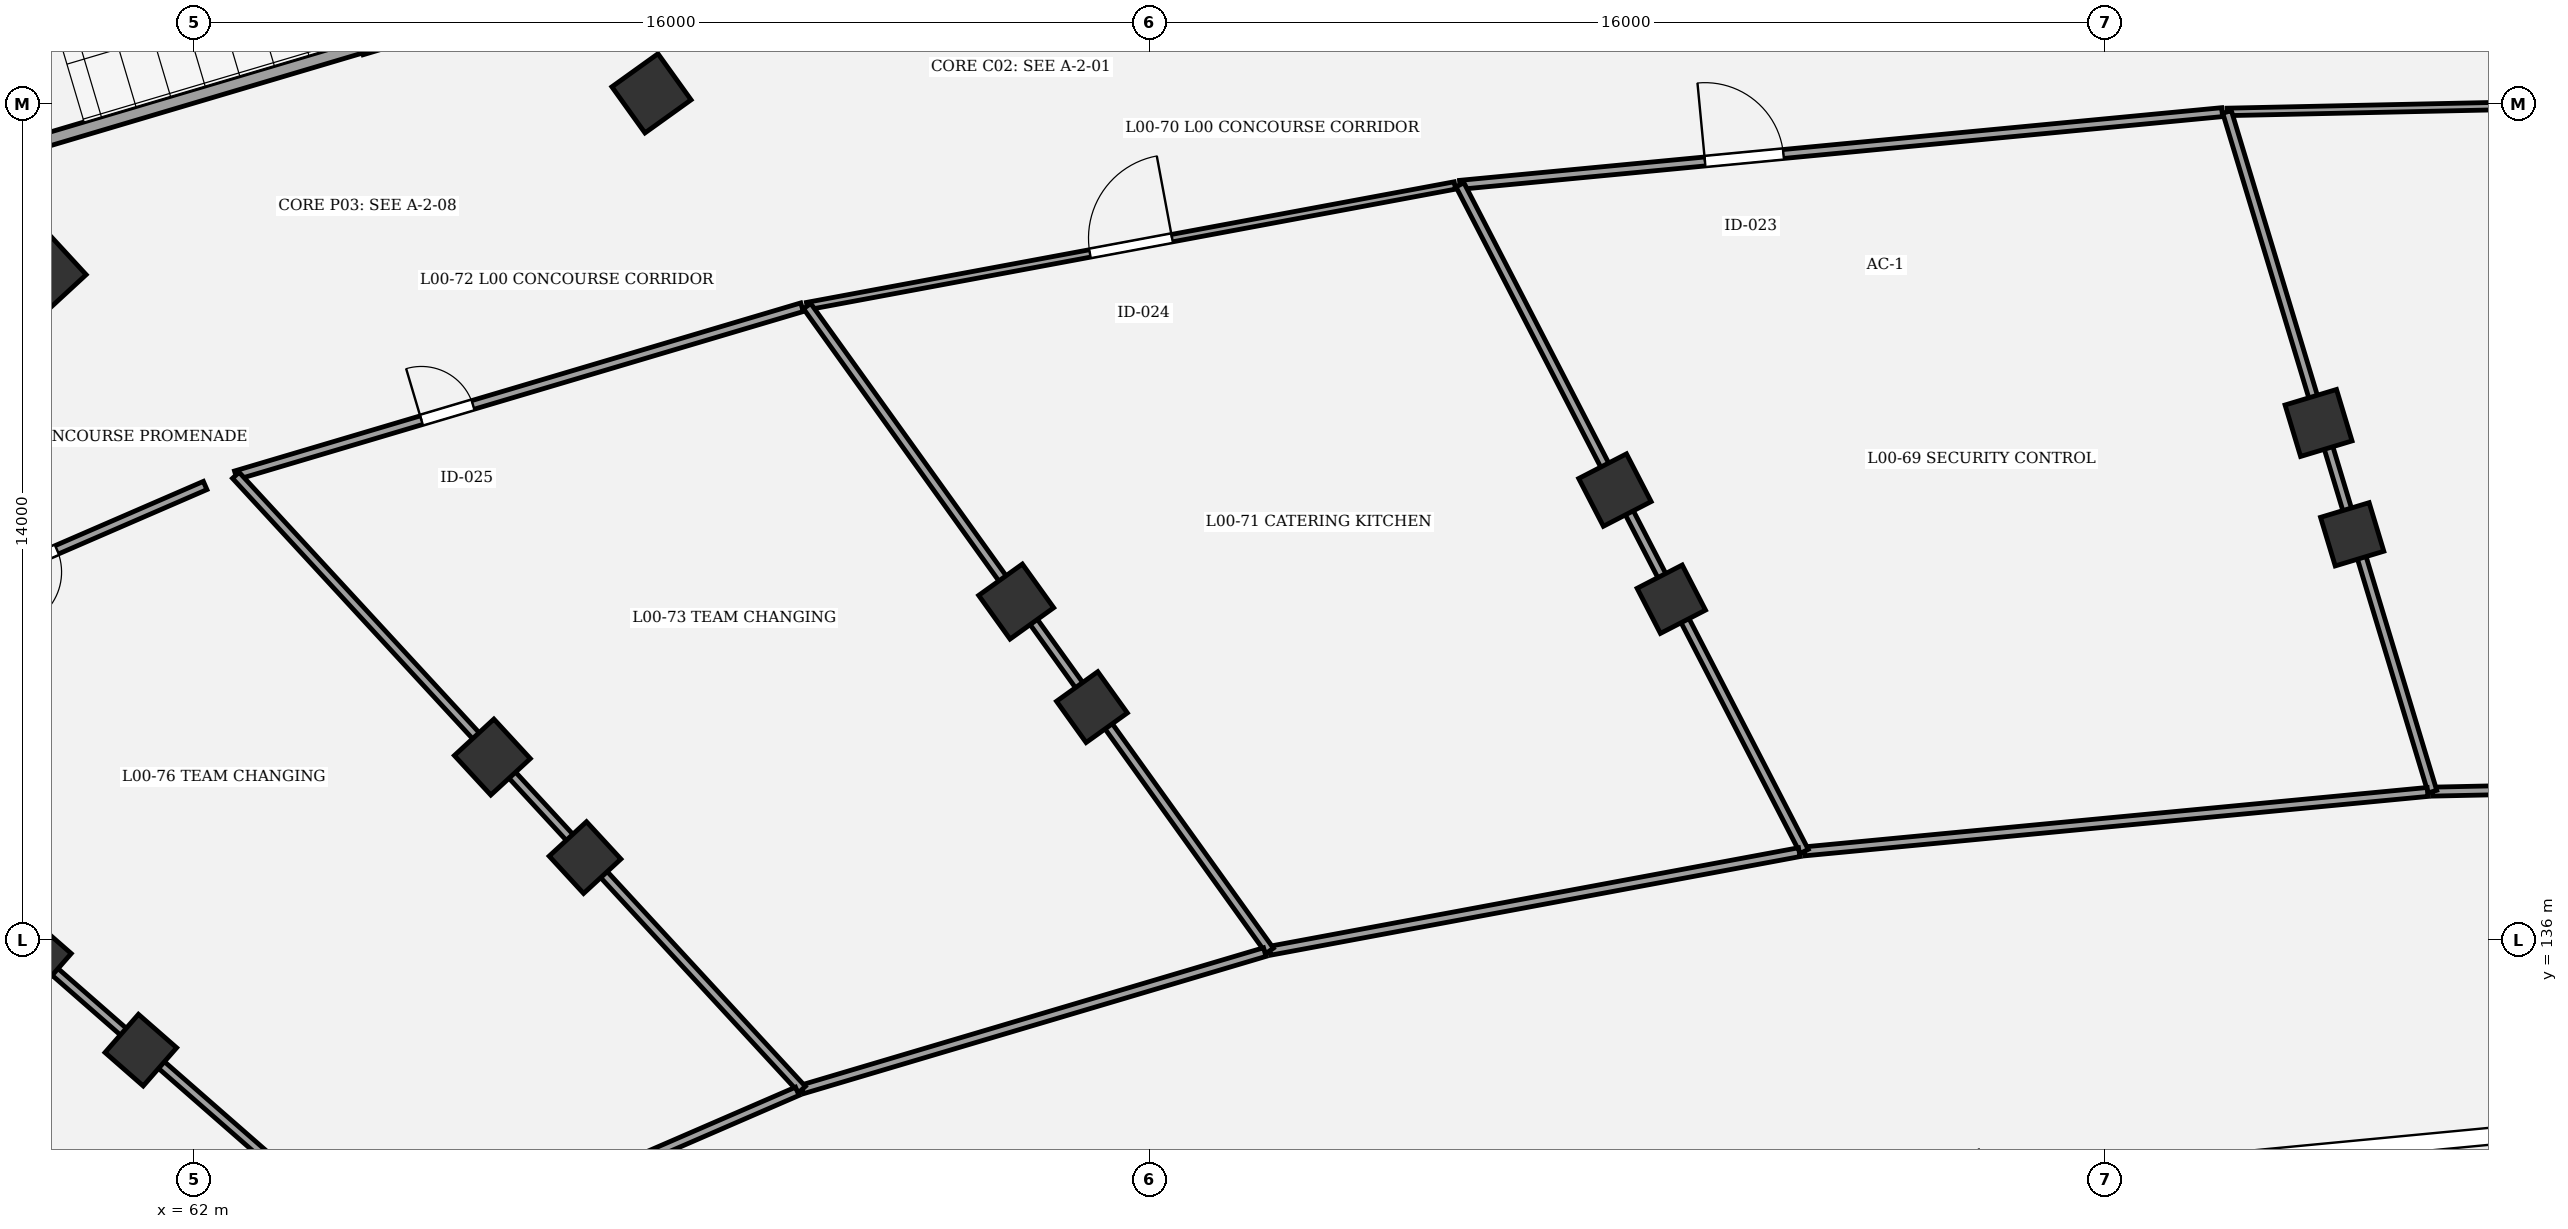
"""IFC4 building model, lengths in metres.
Left out: names, types, materials, properties, quantities, classifications, styles, units other than length and angle.
Written with IfcOpenShell. Run it as: python <this file> out.ifc"""

import sys

from ifc_helpers import new_model, si_unit, direction, frame, frame_2d, origin, origin_2d, place, context, subcontext, project, spatial, rectangle, extrude, element, fill, save


model = new_model("IFC4")
c1 = context("Model", 3, precision=1e-05, world=origin(), true_north=direction((0.0, 1.0)))
c2 = subcontext(c1, "Body", "Model", "MODEL_VIEW")
j1 = project(units=[si_unit("LENGTHUNIT", "METRE"), si_unit("PLANEANGLEUNIT", "RADIAN")], contexts=[c1])
p1 = place(None, origin())
s1 = spatial("IfcSite", under=j1, at=p1, CompositionType="ELEMENT")
p2 = place(p1, origin())
s2 = spatial("IfcBuilding", under=s1, at=p2, CompositionType="ELEMENT")
p3 = place(p2, origin())
s3 = spatial("IfcBuildingStorey", under=s2, at=p3, CompositionType="ELEMENT", Elevation=0.0)
p4 = place(p3, frame((98.143, 142.793, 0.0), z_axis=(0.0, 0.0, 1.0), x_axis=(-0.289198876314, 0.957269037387, 0.0)))
e1 = element("IfcColumn", 1, at=p4, inside=s3, PredefinedType="COLUMN", context=c2, shape_type="SweptSolid", body=[
    extrude(rectangle(XDim=0.85, YDim=0.85, at=origin_2d()), origin(), (0.0, 0.0, 1.0), 5.4),
])
p5 = place(p3, frame((97.58, 144.657, 0.0), z_axis=(0.0, 0.0, 1.0), x_axis=(-0.289198876314, 0.957269037387, 0.0)))
e2 = element("IfcColumn", 2, at=p5, inside=s3, PredefinedType="COLUMN", context=c2, shape_type="SweptSolid", body=[
    extrude(rectangle(XDim=0.9, YDim=0.9, at=origin_2d()), origin(), (0.0, 0.0, 1.0), 5.4),
])
p6 = place(p3, frame((86.741, 141.706, 0.0), z_axis=(0.0, 0.0, 1.0), x_axis=(-0.458959712465, 0.888457079624, 0.0)))
e3 = element("IfcColumn", 3, at=p6, inside=s3, PredefinedType="COLUMN", context=c2, shape_type="SweptSolid", body=[
    extrude(rectangle(XDim=0.85, YDim=0.85, at=origin_2d()), origin(), (0.0, 0.0, 1.0), 5.4),
])
p7 = place(p3, frame((85.796, 143.534, 0.0), z_axis=(0.0, 0.0, 1.0), x_axis=(-0.458959712465, 0.888457079624, 0.0)))
e4 = element("IfcColumn", 4, at=p7, inside=s3, PredefinedType="COLUMN", context=c2, shape_type="SweptSolid", body=[
    extrude(rectangle(XDim=0.9, YDim=0.9, at=origin_2d()), origin(), (0.0, 0.0, 1.0), 5.4),
])
p8 = place(p3, frame((77.038, 139.899, 0.0), z_axis=(0.0, 0.0, 1.0), x_axis=(-0.582974127943, 0.812490717577, 0.0)))
e5 = element("IfcColumn", 5, at=p8, inside=s3, PredefinedType="COLUMN", context=c2, shape_type="SweptSolid", body=[
    extrude(rectangle(XDim=0.85, YDim=0.85, at=origin_2d()), origin(), (0.0, 0.0, 1.0), 5.4),
])
p9 = place(p3, frame((75.77, 141.667, 0.0), z_axis=(0.0, 0.0, 1.0), x_axis=(-0.582974127943, 0.812490717577, 0.0)))
e6 = element("IfcColumn", 6, at=p9, inside=s3, PredefinedType="COLUMN", context=c2, shape_type="SweptSolid", body=[
    extrude(rectangle(XDim=0.9, YDim=0.9, at=origin_2d()), origin(), (0.0, 0.0, 1.0), 5.4),
])
p10 = place(p3, frame((69.662, 150.177, 0.0), z_axis=(0.0, 0.0, 1.0), x_axis=(-0.582974127943, 0.812490717577, 0.0)))
e7 = element("IfcColumn", 7, at=p10, inside=s3, PredefinedType="COLUMN", context=c2, shape_type="SweptSolid", body=[
    extrude(rectangle(XDim=0.95, YDim=0.95, at=origin_2d()), origin(), (0.0, 0.0, 1.0), 5.4),
])
p11 = place(p3, frame((68.55, 137.379, 0.0), z_axis=(0.0, 0.0, 1.0), x_axis=(-0.677903094969, 0.735151272753, 0.0)))
e8 = element("IfcColumn", 8, at=p11, inside=s3, PredefinedType="COLUMN", context=c2, shape_type="SweptSolid", body=[
    extrude(rectangle(XDim=0.85, YDim=0.85, at=origin_2d()), origin(), (0.0, 0.0, 1.0), 5.4),
])
p12 = place(p3, frame((66.997, 139.062, 0.0), z_axis=(0.0, 0.0, 1.0), x_axis=(-0.677903094969, 0.735151272753, 0.0)))
e9 = element("IfcColumn", 9, at=p12, inside=s3, PredefinedType="COLUMN", context=c2, shape_type="SweptSolid", body=[
    extrude(rectangle(XDim=0.9, YDim=0.9, at=origin_2d()), origin(), (0.0, 0.0, 1.0), 5.4),
])
p13 = place(p3, frame((59.524, 147.168, 0.0), z_axis=(0.0, 0.0, 1.0), x_axis=(-0.677903094969, 0.735151272753, 0.0)))
e10 = element("IfcColumn", 10, at=p13, inside=s3, PredefinedType="COLUMN", context=c2, shape_type="SweptSolid", body=[
    extrude(rectangle(XDim=0.95, YDim=0.95, at=origin_2d()), origin(), (0.0, 0.0, 1.0), 5.4),
])
p14 = place(p3, frame((61.111, 134.154, 0.0), z_axis=(0.0, 0.0, 1.0), x_axis=(-0.752529860433, 0.658558128912, 0.0)))
e11 = element("IfcColumn", 11, at=p14, inside=s3, PredefinedType="COLUMN", context=c2, shape_type="SweptSolid", body=[
    extrude(rectangle(XDim=0.85, YDim=0.85, at=origin_2d()), origin(), (0.0, 0.0, 1.0), 5.4),
])
p15 = place(p3, frame((59.31, 135.73, 0.0), z_axis=(0.0, 0.0, 1.0), x_axis=(-0.752529860433, 0.658558128912, 0.0)))
e12 = element("IfcColumn", 12, at=p15, inside=s3, PredefinedType="COLUMN", context=c2, shape_type="SweptSolid", body=[
    extrude(rectangle(XDim=0.9, YDim=0.9, at=origin_2d()), origin(), (0.0, 0.0, 1.0), 5.4),
])
p16 = place(p3, frame((64.946, 150.972, 0.0), z_axis=(0.0, 0.0, 1.0), x_axis=(0.958670893355, 0.284517342588, 0.0)))
e13 = element("IfcColumn", 13, at=p16, inside=s3, PredefinedType="COLUMN", context=c2, shape_type="SweptSolid", body=[
    extrude(rectangle(XDim=0.3, YDim=0.22, at=origin_2d()), origin(), (0.0, 0.0, 1.0), 5.4),
])
p17 = place(p3, frame((58.15, 148.986, 0.0), z_axis=(0.0, 0.0, 1.0), x_axis=(0.958665631999, 0.284535069937, 0.0)))
e14 = element("IfcWall", 14, at=p17, inside=s3, PredefinedType="SHEAR", context=c2, shape_type="SweptSolid", body=[
    extrude(rectangle(XDim=8.54, YDim=0.22, at=frame_2d((4.27, 0.0))), origin(), (0.0, 0.0, 1.0), 5.15),
])
p18 = place(p17, frame((0.3, 0.0, 0.0)))
e15 = element("IfcOpeningElement", 15, at=p18, cuts=e14, PredefinedType="OPENING", context=c2, shape_type="SweptSolid", body=[
    extrude(rectangle(XDim=1.15, YDim=2.15, at=frame_2d((0.575, 1.075))), frame((0.0, 0.12, 0.0), z_axis=(0.0, -1.0, 0.0), x_axis=(1.0, 0.0, 0.0)), (0.0, 0.0, 1.0), 0.24),
])
p19 = place(p3, frame((96.047, 149.866, 0.0), z_axis=(0.0, 0.0, 1.0), x_axis=(0.999768266483, 0.021527037261, 0.0)))
e16 = element("IfcWall", 16, at=p19, inside=s3, PredefinedType="PARTITIONING", context=c2, shape_type="SweptSolid", body=[
    extrude(rectangle(XDim=18.917, YDim=0.125, at=frame_2d((9.458, 0.0))), origin(), (0.0, 0.0, 1.0), 4.15),
])
p20 = place(p19, frame((8.848, 0.0, 0.0)))
e17 = element("IfcOpeningElement", 17, at=p20, cuts=e16, PredefinedType="OPENING", context=c2, shape_type="SweptSolid", body=[
    extrude(rectangle(XDim=1.22, YDim=2.2, at=frame_2d((0.61, 1.1))), frame((0.0, 0.073, 0.0), z_axis=(0.0, -1.0, 0.0), x_axis=(1.0, 0.0, 0.0)), (0.0, 0.0, 1.0), 0.145),
])
p21 = place(p3, frame((83.201, 148.645, 0.0), z_axis=(0.0, 0.0, 1.0), x_axis=(0.995485111947, 0.094917816515, 0.0)))
e18 = element("IfcWall", 18, at=p21, inside=s3, PredefinedType="PARTITIONING", context=c2, shape_type="SweptSolid", body=[
    extrude(rectangle(XDim=12.822, YDim=0.15, at=frame_2d((6.411, 0.0))), origin(), (0.0, 0.0, 1.0), 4.15),
])
p22 = place(p21, frame((4.122, 0.0, 0.0)))
e19 = element("IfcOpeningElement", 19, at=p22, cuts=e18, PredefinedType="OPENING", context=c2, shape_type="SweptSolid", body=[
    extrude(rectangle(XDim=1.32, YDim=2.2, at=frame_2d((0.66, 1.1))), frame((0.0, 0.085, 0.0), z_axis=(0.0, -1.0, 0.0), x_axis=(1.0, 0.0, 0.0)), (0.0, 0.0, 1.0), 0.17),
])
p23 = place(p3, frame((72.268, 146.614, 0.0), z_axis=(0.0, 0.0, 1.0), x_axis=(0.983097372707, 0.183083466695, 0.0)))
e20 = element("IfcWall", 20, at=p23, inside=s3, PredefinedType="PARTITIONING", context=c2, shape_type="SweptSolid", body=[
    extrude(rectangle(XDim=11.035, YDim=0.125, at=frame_2d((5.517, 0.0))), origin(), (0.0, 0.0, 1.0), 4.15),
])
p24 = place(p23, frame((4.817, 0.0, 0.0)))
e21 = element("IfcOpeningElement", 21, at=p24, cuts=e20, PredefinedType="OPENING", context=c2, shape_type="SweptSolid", body=[
    extrude(rectangle(XDim=1.4, YDim=2.2, at=frame_2d((0.7, 1.1))), frame((0.0, 0.073, 0.0), z_axis=(0.0, -1.0, 0.0), x_axis=(1.0, 0.0, 0.0)), (0.0, 0.0, 1.0), 0.145),
])
p25 = place(p3, frame((62.701, 143.781, 0.0), z_axis=(0.0, 0.0, 1.0), x_axis=(0.958655809656, 0.284568161629, 0.0)))
e22 = element("IfcWall", 22, at=p25, inside=s3, PredefinedType="PARTITIONING", context=c2, shape_type="SweptSolid", body=[
    extrude(rectangle(XDim=9.891, YDim=0.15, at=frame_2d((4.946, 0.0))), origin(), (0.0, 0.0, 1.0), 4.15),
])
p26 = place(p25, frame((3.243, 0.0, 0.0)))
e23 = element("IfcOpeningElement", 23, at=p26, cuts=e22, PredefinedType="OPENING", context=c2, shape_type="SweptSolid", body=[
    extrude(rectangle(XDim=0.9, YDim=2.3, at=frame_2d((0.45, 1.15))), frame((0.0, 0.085, 0.0), z_axis=(0.0, -1.0, 0.0), x_axis=(1.0, 0.0, 0.0)), (0.0, 0.0, 1.0), 0.17),
])
p27 = place(p3, frame((62.188, 143.61, 0.0), z_axis=(0.0, 0.0, 1.0), x_axis=(-0.917494644255, -0.397748133575, 0.0)))
e24 = element("IfcWall", 24, at=p27, inside=s3, PredefinedType="PARTITIONING", context=c2, shape_type="SweptSolid", body=[
    extrude(rectangle(XDim=4.09, YDim=0.15, at=frame_2d((2.045, 0.0))), origin(), (0.0, 0.0, 1.0), 4.15),
])
p28 = place(p27, frame((2.705, 0.0, 0.0)))
e25 = element("IfcOpeningElement", 25, at=p28, cuts=e24, PredefinedType="OPENING", context=c2, shape_type="SweptSolid", body=[
    extrude(rectangle(XDim=0.94, YDim=2.3, at=frame_2d((0.47, 1.15))), frame((0.0, 0.085, 0.0), z_axis=(0.0, -1.0, 0.0), x_axis=(1.0, 0.0, 0.0)), (0.0, 0.0, 1.0), 0.17),
])
p29 = place(p3, frame((114.96, 138.817, 0.0), z_axis=(0.0, 0.0, 1.0), x_axis=(-0.999768149952, -0.021532448558, 0.0)))
e26 = element("IfcWall", 26, at=p29, inside=s3, PredefinedType="PARTITIONING", context=c2, shape_type="SweptSolid", body=[
    extrude(rectangle(XDim=15.477, YDim=0.15, at=frame_2d((7.738, 0.0))), origin(), (0.0, 0.0, 1.0), 4.15),
])
p30 = place(p3, frame((99.487, 138.483, 0.0), z_axis=(0.0, 0.0, 1.0), x_axis=(-0.289240317571, 0.957256516662, 0.0)))
e27 = element("IfcWall", 27, at=p30, inside=s3, PredefinedType="PARTITIONING", context=c2, shape_type="SweptSolid", body=[
    extrude(rectangle(XDim=11.891, YDim=0.15, at=frame_2d((5.946, 0.0))), origin(), (0.0, 0.0, 1.0), 4.15),
])
p31 = place(p3, frame((99.405, 138.478, 0.0), z_axis=(0.0, 0.0, 1.0), x_axis=(-0.99548363917, -0.094933261529, 0.0)))
e28 = element("IfcWall", 28, at=p31, inside=s3, PredefinedType="PARTITIONING", context=c2, shape_type="SweptSolid", body=[
    extrude(rectangle(XDim=10.485, YDim=0.15, at=frame_2d((5.242, 0.0))), origin(), (0.0, 0.0, 1.0), 4.15),
])
p32 = place(p3, frame((88.967, 137.483, 0.0), z_axis=(0.0, 0.0, 1.0), x_axis=(-0.458958189589, 0.888457866311, 0.0)))
e29 = element("IfcWall", 29, at=p32, inside=s3, PredefinedType="PARTITIONING", context=c2, shape_type="SweptSolid", body=[
    extrude(rectangle(XDim=12.564, YDim=0.15, at=frame_2d((6.282, 0.0))), origin(), (0.0, 0.0, 1.0), 4.15),
])
p33 = place(p3, frame((88.884, 137.47, 0.0), z_axis=(0.0, 0.0, 1.0), x_axis=(-0.983094830755, -0.183097115603, 0.0)))
e30 = element("IfcWall", 30, at=p33, inside=s3, PredefinedType="PARTITIONING", context=c2, shape_type="SweptSolid", body=[
    extrude(rectangle(XDim=9.021, YDim=0.15, at=frame_2d((4.51, 0.0))), origin(), (0.0, 0.0, 1.0), 4.15),
])
p34 = place(p3, frame((80.016, 135.818, 0.0), z_axis=(0.0, 0.0, 1.0), x_axis=(-0.583032067708, 0.812449141808, 0.0)))
e31 = element("IfcWall", 31, at=p34, inside=s3, PredefinedType="PARTITIONING", context=c2, shape_type="SweptSolid", body=[
    extrude(rectangle(XDim=13.288, YDim=0.15, at=frame_2d((6.644, 0.0))), origin(), (0.0, 0.0, 1.0), 4.15),
])
p35 = place(p3, frame((79.933, 135.796, 0.0), z_axis=(0.0, 0.0, 1.0), x_axis=(-0.958664246127, -0.284539739226, 0.0)))
e32 = element("IfcWall", 32, at=p35, inside=s3, PredefinedType="PARTITIONING", context=c2, shape_type="SweptSolid", body=[
    extrude(rectangle(XDim=8.083, YDim=0.15, at=frame_2d((4.042, 0.0))), origin(), (0.0, 0.0, 1.0), 4.15),
])
p36 = place(p3, frame((72.184, 133.496, 0.0), z_axis=(0.0, 0.0, 1.0), x_axis=(-0.677850870133, 0.735199427271, 0.0)))
e33 = element("IfcWall", 33, at=p36, inside=s3, PredefinedType="PARTITIONING", context=c2, shape_type="SweptSolid", body=[
    extrude(rectangle(XDim=13.989, YDim=0.15, at=frame_2d((6.995, 0.0))), origin(), (0.0, 0.0, 1.0), 4.15),
])
p37 = place(p3, frame((65.32, 130.524, 0.0), z_axis=(0.0, 0.0, 1.0), x_axis=(-0.752559770496, 0.658523949322, 0.0)))
e34 = element("IfcWall", 34, at=p37, inside=s3, PredefinedType="PARTITIONING", context=c2, shape_type="SweptSolid", body=[
    extrude(rectangle(XDim=8.936, YDim=0.15, at=frame_2d((4.468, 0.0))), origin(), (0.0, 0.0, 1.0), 4.15),
])
p38 = place(p3, frame((72.104, 133.465, 0.0), z_axis=(0.0, 0.0, 1.0), x_axis=(-0.917502611666, -0.397729754463, 0.0)))
e35 = element("IfcWall", 35, at=p38, inside=s3, PredefinedType="PARTITIONING", context=c2, shape_type="SweptSolid", body=[
    extrude(rectangle(XDim=7.394, YDim=0.15, at=frame_2d((3.697, 0.0))), origin(), (0.0, 0.0, 1.0), 4.15),
])
p39 = place(p22, origin())
e36 = element("IfcDoor", 36, at=p39, inside=s3, OperationType="SINGLE_SWING_LEFT", PredefinedType="DOOR", context=c2, shape_type="SweptSolid", body=[
    extrude(rectangle(XDim=1.32, YDim=2.2, at=frame_2d((0.66, 1.1))), frame((0.0, 0.025, 0.0), z_axis=(0.0, -1.0, 0.0), x_axis=(1.0, 0.0, 0.0)), (0.0, 0.0, 1.0), 0.05),
])
fill(e19, e36)
p40 = place(p24, origin())
e37 = element("IfcDoor", 37, at=p40, inside=s3, OperationType="SINGLE_SWING_RIGHT", PredefinedType="DOOR", context=c2, shape_type="SweptSolid", body=[
    extrude(rectangle(XDim=1.4, YDim=2.2, at=frame_2d((0.7, 1.1))), frame((0.0, 0.025, 0.0), z_axis=(0.0, -1.0, 0.0), x_axis=(1.0, 0.0, 0.0)), (0.0, 0.0, 1.0), 0.05),
])
fill(e21, e37)
p41 = place(p26, origin())
e38 = element("IfcDoor", 38, at=p41, inside=s3, OperationType="SINGLE_SWING_LEFT", PredefinedType="DOOR", context=c2, shape_type="SweptSolid", body=[
    extrude(rectangle(XDim=0.9, YDim=2.3, at=frame_2d((0.45, 1.15))), frame((0.0, 0.025, 0.0), z_axis=(0.0, -1.0, 0.0), x_axis=(1.0, 0.0, 0.0)), (0.0, 0.0, 1.0), 0.05),
])
fill(e23, e38)
p42 = place(p28, origin())
e39 = element("IfcDoor", 39, at=p42, inside=s3, OperationType="SINGLE_SWING_RIGHT", PredefinedType="DOOR", context=c2, shape_type="SweptSolid", body=[
    extrude(rectangle(XDim=0.94, YDim=2.3, at=frame_2d((0.47, 1.15))), frame((0.0, 0.025, 0.0), z_axis=(0.0, -1.0, 0.0), x_axis=(1.0, 0.0, 0.0)), (0.0, 0.0, 1.0), 0.05),
])
fill(e25, e39)
save(model, sys.argv[1])
